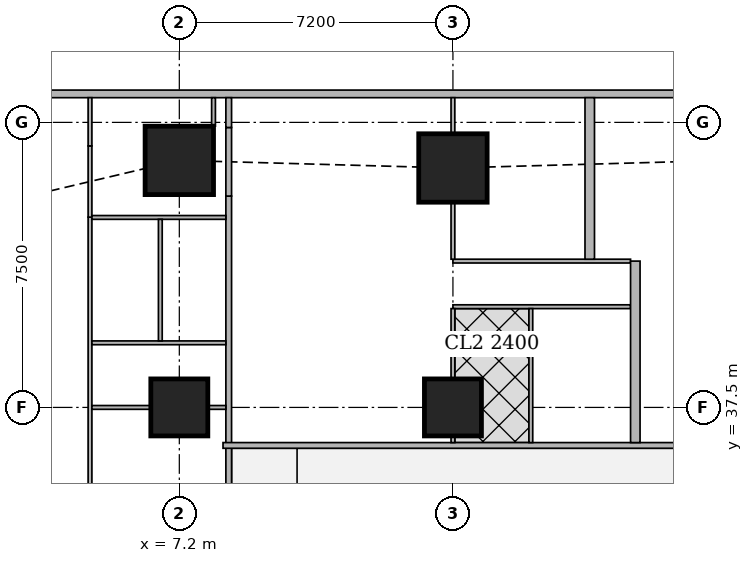
"""IFC4 building model, lengths in metres.
Left out: names, types, materials, properties, quantities, classifications, styles, units other than length and angle.
Written with IfcOpenShell. Run it as: python <this file> out.ifc"""

import sys

from ifc_helpers import new_model, si_unit, direction, frame, frame_2d, origin, origin_2d, place, context, subcontext, project, spatial, rectangle, extrude, element, fill, save


model = new_model("IFC4")
c1 = context("Model", 3, precision=1e-05, world=origin(), true_north=direction((0.0, 1.0)))
c2 = subcontext(c1, "Body", "Model", "MODEL_VIEW")
j1 = project(units=[si_unit("LENGTHUNIT", "METRE"), si_unit("PLANEANGLEUNIT", "RADIAN")], contexts=[c1])
p1 = place(None, origin())
s1 = spatial("IfcSite", under=j1, at=p1, CompositionType="ELEMENT")
p2 = place(p1, origin())
s2 = spatial("IfcBuilding", under=s1, at=p2, CompositionType="ELEMENT")
p3 = place(p2, frame((0.0, 0.0, 158.3)))
s3 = spatial("IfcBuildingStorey", under=s2, at=p3, CompositionType="ELEMENT", Elevation=158.3)
for number, where, z_axis, x_axis in (
    (1, (7.2, 37.5, 0.0), (0.0, 0.0, 1.0), (1.0, 0.0, 0.0)),
    (2, (14.4, 37.5, 0.0), (0.0, 0.0, 1.0), (1.0, 0.0, 0.0)),
):
    element("IfcColumn", number, at=place(p3, frame(where, z_axis=z_axis, x_axis=x_axis)), inside=s3, PredefinedType="COLUMN", context=c2, shape_type="SweptSolid", body=[
        extrude(rectangle(XDim=1.5, YDim=1.5, at=origin_2d()), origin(), (0.0, 0.0, 1.0), 3.75),
    ])
for number, where, z_axis, x_axis in (
    (3, (7.2, 44.0, 0.0), (0.0, 0.0, 1.0), (1.0, 0.0, 0.0)),
    (4, (14.4, 43.8, 0.0), (0.0, 0.0, 1.0), (1.0, 0.0, 0.0)),
):
    element("IfcColumn", number, at=place(p3, frame(where, z_axis=z_axis, x_axis=x_axis)), inside=s3, PredefinedType="COLUMN", context=c2, shape_type="SweptSolid", body=[
        extrude(rectangle(XDim=1.8, YDim=1.8, at=origin_2d()), origin(), (0.0, 0.0, 1.0), 3.75),
    ])
p4 = place(p3, frame((40.106, 45.75, 0.0), z_axis=(0.0, 0.0, 1.0), x_axis=(-1.0, 0.0, 0.0)))
e5 = element("IfcWall", 5, at=p4, inside=s3, PredefinedType="SOLIDWALL", context=c2, shape_type="SweptSolid", body=[
    extrude(rectangle(XDim=37.943, YDim=0.2, at=frame_2d((18.971, 0.0))), origin(), (0.0, 0.0, 1.0), 3.5),
])
p5 = place(p4, frame((8.606, 0.0, 0.9)))
e6 = element("IfcOpeningElement", 6, at=p5, cuts=e5, PredefinedType="OPENING", context=c2, shape_type="SweptSolid", body=[
    extrude(rectangle(XDim=1.8, YDim=1.5, at=frame_2d((0.9, 0.75))), frame((0.0, 0.11, 0.0), z_axis=(0.0, -1.0, 0.0), x_axis=(1.0, 0.0, 0.0)), (0.0, 0.0, 1.0), 0.22),
])
p6 = place(p4, frame((12.206, 0.0, 0.9)))
e7 = element("IfcOpeningElement", 7, at=p6, cuts=e5, PredefinedType="OPENING", context=c2, shape_type="SweptSolid", body=[
    extrude(rectangle(XDim=1.8, YDim=1.5, at=frame_2d((0.9, 0.75))), frame((0.0, 0.11, 0.0), z_axis=(0.0, -1.0, 0.0), x_axis=(1.0, 0.0, 0.0)), (0.0, 0.0, 1.0), 0.22),
])
p7 = place(p4, frame((15.806, 0.0, 0.9)))
e8 = element("IfcOpeningElement", 8, at=p7, cuts=e5, PredefinedType="OPENING", context=c2, shape_type="SweptSolid", body=[
    extrude(rectangle(XDim=1.8, YDim=1.5, at=frame_2d((0.9, 0.75))), frame((0.0, 0.11, 0.0), z_axis=(0.0, -1.0, 0.0), x_axis=(1.0, 0.0, 0.0)), (0.0, 0.0, 1.0), 0.22),
])
p8 = place(p4, frame((19.406, 0.0, 0.9)))
e9 = element("IfcOpeningElement", 9, at=p8, cuts=e5, PredefinedType="OPENING", context=c2, shape_type="SweptSolid", body=[
    extrude(rectangle(XDim=1.8, YDim=1.5, at=frame_2d((0.9, 0.75))), frame((0.0, 0.11, 0.0), z_axis=(0.0, -1.0, 0.0), x_axis=(1.0, 0.0, 0.0)), (0.0, 0.0, 1.0), 0.22),
])
p9 = place(p4, frame((23.006, 0.0, 0.9)))
e10 = element("IfcOpeningElement", 10, at=p9, cuts=e5, PredefinedType="OPENING", context=c2, shape_type="SweptSolid", body=[
    extrude(rectangle(XDim=1.8, YDim=1.5, at=frame_2d((0.9, 0.75))), frame((0.0, 0.11, 0.0), z_axis=(0.0, -1.0, 0.0), x_axis=(1.0, 0.0, 0.0)), (0.0, 0.0, 1.0), 0.22),
])
p10 = place(p4, frame((26.606, 0.0, 0.9)))
e11 = element("IfcOpeningElement", 11, at=p10, cuts=e5, PredefinedType="OPENING", context=c2, shape_type="SweptSolid", body=[
    extrude(rectangle(XDim=1.8, YDim=1.5, at=frame_2d((0.9, 0.75))), frame((0.0, 0.11, 0.0), z_axis=(0.0, -1.0, 0.0), x_axis=(1.0, 0.0, 0.0)), (0.0, 0.0, 1.0), 0.22),
])
p11 = place(p3, frame((8.5, 1.964, 0.0), z_axis=(0.0, 0.0, 1.0), x_axis=(0.0, 1.0, 0.0)))
e12 = element("IfcWall", 12, at=p11, inside=s3, PredefinedType="SOLIDWALL", context=c2, shape_type="SweptSolid", body=[
    extrude(rectangle(XDim=41.097, YDim=0.15, at=frame_2d((20.548, 0.0))), origin(), (0.0, 0.0, 1.0), 3.5),
])
p12 = place(p11, frame((6.911, 0.0, 0.0)))
e13 = element("IfcOpeningElement", 13, at=p12, cuts=e12, PredefinedType="OPENING", context=c2, shape_type="SweptSolid", body=[
    extrude(rectangle(XDim=1.0, YDim=2.1, at=frame_2d((0.5, 1.05))), frame((0.0, 0.085, 0.0), z_axis=(0.0, -1.0, 0.0), x_axis=(1.0, 0.0, 0.0)), (0.0, 0.0, 1.0), 0.17),
])
p13 = place(p11, frame((10.661, 0.0, 0.0)))
e14 = element("IfcOpeningElement", 14, at=p13, cuts=e12, PredefinedType="OPENING", context=c2, shape_type="SweptSolid", body=[
    extrude(rectangle(XDim=1.0, YDim=2.1, at=frame_2d((0.5, 1.05))), frame((0.0, 0.085, 0.0), z_axis=(0.0, -1.0, 0.0), x_axis=(1.0, 0.0, 0.0)), (0.0, 0.0, 1.0), 0.17),
])
p14 = place(p11, frame((25.661, 0.0, 0.0)))
e15 = element("IfcOpeningElement", 15, at=p14, cuts=e12, PredefinedType="OPENING", context=c2, shape_type="SweptSolid", body=[
    extrude(rectangle(XDim=1.0, YDim=2.1, at=frame_2d((0.5, 1.05))), frame((0.0, 0.085, 0.0), z_axis=(0.0, -1.0, 0.0), x_axis=(1.0, 0.0, 0.0)), (0.0, 0.0, 1.0), 0.17),
])
p15 = place(p3, frame((8.5, 43.061, 0.0), z_axis=(0.0, 0.0, 1.0), x_axis=(0.0, 1.0, 0.0)))
e16 = element("IfcWall", 16, at=p15, inside=s3, PredefinedType="SOLIDWALL", context=c2, shape_type="SweptSolid", body=[
    extrude(rectangle(XDim=1.805, YDim=0.15, at=frame_2d((0.902, 0.0))), origin(), (0.0, 0.0, 1.0), 2.1),
])
p16 = place(p3, frame((8.5, 44.866, 0.0), z_axis=(0.0, 0.0, 1.0), x_axis=(0.0, 1.0, 0.0)))
e17 = element("IfcWall", 17, at=p16, inside=s3, PredefinedType="SOLIDWALL", context=c2, shape_type="SweptSolid", body=[
    extrude(rectangle(XDim=0.784, YDim=0.15, at=frame_2d((0.392, 0.0))), origin(), (0.0, 0.0, 1.0), 3.5),
])
p17 = place(p3, frame((8.35, 36.5, 0.0), z_axis=(0.0, 0.0, 1.0), x_axis=(1.0, 0.0, 0.0)))
e18 = element("IfcWall", 18, at=p17, inside=s3, PredefinedType="SOLIDWALL", context=c2, shape_type="SweptSolid", body=[
    extrude(rectangle(XDim=26.415, YDim=0.15, at=frame_2d((13.208, 0.0))), origin(), (0.0, 0.0, 1.0), 3.5),
])
p18 = place(p17, frame((2.6, 0.0, 0.0)))
e19 = element("IfcOpeningElement", 19, at=p18, cuts=e18, PredefinedType="OPENING", context=c2, shape_type="SweptSolid", body=[
    extrude(rectangle(XDim=1.0, YDim=2.1, at=frame_2d((0.5, 1.05))), frame((0.0, 0.085, 0.0), z_axis=(0.0, -1.0, 0.0), x_axis=(1.0, 0.0, 0.0)), (0.0, 0.0, 1.0), 0.17),
])
p19 = place(p17, frame((10.949, 0.0, 0.0)))
e20 = element("IfcOpeningElement", 20, at=p19, cuts=e18, PredefinedType="OPENING", context=c2, shape_type="SweptSolid", body=[
    extrude(rectangle(XDim=1.0, YDim=2.1, at=frame_2d((0.5, 1.05))), frame((0.0, 0.085, 0.0), z_axis=(0.0, -1.0, 0.0), x_axis=(1.0, 0.0, 0.0)), (0.0, 0.0, 1.0), 0.17),
])
p20 = place(p3, frame((8.1, 45.65, 0.0), z_axis=(0.0, 0.0, 1.0), x_axis=(0.0, -1.0, 0.0)))
e21 = element("IfcWall", 21, at=p20, inside=s3, PredefinedType="PARTITIONING", context=c2, shape_type="SweptSolid", body=[
    extrude(rectangle(XDim=0.749, YDim=0.1, at=frame_2d((0.375, 0.0))), origin(), (0.0, 0.0, 1.0), 3.5),
])
p21 = place(p3, frame((4.85, 30.0, 0.0), z_axis=(0.0, 0.0, 1.0), x_axis=(0.0, 1.0, 0.0)))
e22 = element("IfcWall", 22, at=p21, inside=s3, PredefinedType="PARTITIONING", context=c2, shape_type="SweptSolid", body=[
    extrude(rectangle(XDim=12.507, YDim=0.1, at=frame_2d((6.253, 0.0))), origin(), (0.0, 0.0, 1.0), 3.5),
])
p22 = place(p21, frame((0.575, 0.0, 0.0)))
e23 = element("IfcOpeningElement", 23, at=p22, cuts=e22, PredefinedType="OPENING", context=c2, shape_type="SweptSolid", body=[
    extrude(rectangle(XDim=0.9, YDim=2.1, at=frame_2d((0.45, 1.05))), frame((0.0, 0.06, 0.0), z_axis=(0.0, -1.0, 0.0), x_axis=(1.0, 0.0, 0.0)), (0.0, 0.0, 1.0), 0.12),
])
p23 = place(p21, frame((5.799, 0.0, 0.0)))
e24 = element("IfcOpeningElement", 24, at=p23, cuts=e22, PredefinedType="OPENING", context=c2, shape_type="SweptSolid", body=[
    extrude(rectangle(XDim=0.9, YDim=2.1, at=frame_2d((0.45, 1.05))), frame((0.0, 0.06, 0.0), z_axis=(0.0, -1.0, 0.0), x_axis=(1.0, 0.0, 0.0)), (0.0, 0.0, 1.0), 0.12),
])
p24 = place(p21, frame((7.9, 0.0, 0.0)))
e25 = element("IfcOpeningElement", 25, at=p24, cuts=e22, PredefinedType="OPENING", context=c2, shape_type="SweptSolid", body=[
    extrude(rectangle(XDim=0.9, YDim=2.1, at=frame_2d((0.45, 1.05))), frame((0.0, 0.06, 0.0), z_axis=(0.0, -1.0, 0.0), x_axis=(1.0, 0.0, 0.0)), (0.0, 0.0, 1.0), 0.12),
])
p25 = place(p21, frame((3.075, 0.0, 0.0)))
e26 = element("IfcOpeningElement", 26, at=p25, cuts=e22, PredefinedType="OPENING", context=c2, shape_type="SweptSolid", body=[
    extrude(rectangle(XDim=0.9, YDim=2.1, at=frame_2d((0.45, 1.05))), frame((0.0, 0.06, 0.0), z_axis=(0.0, -1.0, 0.0), x_axis=(1.0, 0.0, 0.0)), (0.0, 0.0, 1.0), 0.12),
])
p26 = place(p21, frame((10.4, 0.0, 0.0)))
e27 = element("IfcOpeningElement", 27, at=p26, cuts=e22, PredefinedType="OPENING", context=c2, shape_type="SweptSolid", body=[
    extrude(rectangle(XDim=0.9, YDim=2.1, at=frame_2d((0.45, 1.05))), frame((0.0, 0.06, 0.0), z_axis=(0.0, -1.0, 0.0), x_axis=(1.0, 0.0, 0.0)), (0.0, 0.0, 1.0), 0.12),
])
p27 = place(p3, frame((4.85, 42.507, 0.0), z_axis=(0.0, 0.0, 1.0), x_axis=(0.0, 1.0, 0.0)))
e28 = element("IfcWall", 28, at=p27, inside=s3, PredefinedType="PARTITIONING", context=c2, shape_type="SweptSolid", body=[
    extrude(rectangle(XDim=1.874, YDim=0.1, at=frame_2d((0.937, 0.0))), origin(), (0.0, 0.0, 1.0), 2.1),
])
p28 = place(p3, frame((4.85, 44.381, 0.0), z_axis=(0.0, 0.0, 1.0), x_axis=(0.0, 1.0, 0.0)))
e29 = element("IfcWall", 29, at=p28, inside=s3, PredefinedType="PARTITIONING", context=c2, shape_type="SweptSolid", body=[
    extrude(rectangle(XDim=1.269, YDim=0.1, at=frame_2d((0.634, 0.0))), origin(), (0.0, 0.0, 1.0), 3.5),
])
p29 = place(p28, frame((0.15, 0.0, 0.0)))
e30 = element("IfcOpeningElement", 30, at=p29, cuts=e29, PredefinedType="OPENING", context=c2, shape_type="SweptSolid", body=[
    extrude(rectangle(XDim=0.9, YDim=2.1, at=frame_2d((0.45, 1.05))), frame((0.0, 0.06, 0.0), z_axis=(0.0, -1.0, 0.0), x_axis=(1.0, 0.0, 0.0)), (0.0, 0.0, 1.0), 0.12),
])
p30 = place(p3, frame((4.9, 37.5, 0.0), z_axis=(0.0, 0.0, 1.0), x_axis=(1.0, 0.0, 0.0)))
e31 = element("IfcWall", 31, at=p30, inside=s3, PredefinedType="PARTITIONING", context=c2, shape_type="SweptSolid", body=[
    extrude(rectangle(XDim=1.549, YDim=0.1, at=frame_2d((0.774, 0.0))), origin(), (0.0, 0.0, 1.0), 3.5),
])
p31 = place(p3, frame((7.951, 37.5, 0.0), z_axis=(0.0, 0.0, 1.0), x_axis=(1.0, 0.0, 0.0)))
e32 = element("IfcWall", 32, at=p31, inside=s3, PredefinedType="PARTITIONING", context=c2, shape_type="SweptSolid", body=[
    extrude(rectangle(XDim=0.474, YDim=0.1, at=frame_2d((0.237, 0.0))), origin(), (0.0, 0.0, 1.0), 3.5),
])
for number, where, z_axis, x_axis in (
    (33, (4.9, 42.499, 0.0), (0.0, 0.0, 1.0), (1.0, 0.0, 0.0)),
    (34, (4.9, 39.2, 0.0), (0.0, 0.0, 1.0), (1.0, 0.0, 0.0)),
):
    element("IfcWall", number, at=place(p3, frame(where, z_axis=z_axis, x_axis=x_axis)), inside=s3, PredefinedType="PARTITIONING", context=c2, shape_type="SweptSolid", body=[
        extrude(rectangle(XDim=3.525, YDim=0.1, at=frame_2d((1.763, 0.0))), origin(), (0.0, 0.0, 1.0), 3.5),
    ])
p32 = place(p3, frame((14.4, 41.35, 0.0), z_axis=(0.0, 0.0, 1.0), x_axis=(1.0, 0.0, 0.0)))
e35 = element("IfcWall", 35, at=p32, inside=s3, PredefinedType="PARTITIONING", context=c2, shape_type="SweptSolid", body=[
    extrude(rectangle(XDim=4.674, YDim=0.1, at=frame_2d((2.337, 0.0))), origin(), (0.0, 0.0, 1.0), 3.5),
])
p33 = place(p32, frame((0.2, 0.0, 0.0)))
e36 = element("IfcOpeningElement", 36, at=p33, cuts=e35, PredefinedType="OPENING", context=c2, shape_type="SweptSolid", body=[
    extrude(rectangle(XDim=0.9, YDim=2.1, at=frame_2d((0.45, 1.05))), frame((0.0, 0.06, 0.0), z_axis=(0.0, -1.0, 0.0), x_axis=(1.0, 0.0, 0.0)), (0.0, 0.0, 1.0), 0.12),
])
p34 = place(p3, frame((14.4, 40.15, 0.0), z_axis=(0.0, 0.0, 1.0), x_axis=(1.0, 0.0, 0.0)))
e37 = element("IfcWall", 37, at=p34, inside=s3, PredefinedType="PARTITIONING", context=c2, shape_type="SweptSolid", body=[
    extrude(rectangle(XDim=4.674, YDim=0.1, at=frame_2d((2.337, 0.0))), origin(), (0.0, 0.0, 1.0), 3.5),
])
p35 = place(p34, frame((0.575, 0.0, 0.0)))
e38 = element("IfcOpeningElement", 38, at=p35, cuts=e37, PredefinedType="OPENING", context=c2, shape_type="SweptSolid", body=[
    extrude(rectangle(XDim=0.9, YDim=2.1, at=frame_2d((0.45, 1.05))), frame((0.0, 0.06, 0.0), z_axis=(0.0, -1.0, 0.0), x_axis=(1.0, 0.0, 0.0)), (0.0, 0.0, 1.0), 0.12),
])
p36 = place(p34, frame((2.975, 0.0, 0.0)))
e39 = element("IfcOpeningElement", 39, at=p36, cuts=e37, PredefinedType="OPENING", context=c2, shape_type="SweptSolid", body=[
    extrude(rectangle(XDim=0.9, YDim=2.1, at=frame_2d((0.45, 1.05))), frame((0.0, 0.06, 0.0), z_axis=(0.0, -1.0, 0.0), x_axis=(1.0, 0.0, 0.0)), (0.0, 0.0, 1.0), 0.12),
])
p37 = place(p3, frame((14.4, 41.4, 0.0), z_axis=(0.0, 0.0, 1.0), x_axis=(0.0, 1.0, 0.0)))
e40 = element("IfcWall", 40, at=p37, inside=s3, PredefinedType="PARTITIONING", context=c2, shape_type="SweptSolid", body=[
    extrude(rectangle(XDim=1.499, YDim=0.1, at=frame_2d((0.75, 0.0))), origin(), (0.0, 0.0, 1.0), 3.5),
])
p38 = place(p3, frame((14.4, 44.701, 0.0), z_axis=(0.0, 0.0, 1.0), x_axis=(0.0, 1.0, 0.0)))
e41 = element("IfcWall", 41, at=p38, inside=s3, PredefinedType="PARTITIONING", context=c2, shape_type="SweptSolid", body=[
    extrude(rectangle(XDim=0.949, YDim=0.1, at=frame_2d((0.475, 0.0))), origin(), (0.0, 0.0, 1.0), 3.5),
])
p39 = place(p3, frame((14.4, 36.575, 0.0), z_axis=(0.0, 0.0, 1.0), x_axis=(0.0, 1.0, 0.0)))
e42 = element("IfcWall", 42, at=p39, inside=s3, PredefinedType="PARTITIONING", context=c2, shape_type="SweptSolid", body=[
    extrude(rectangle(XDim=0.174, YDim=0.1, at=frame_2d((0.087, 0.0))), origin(), (0.0, 0.0, 1.0), 3.5),
])
p40 = place(p3, frame((14.4, 38.251, 0.0), z_axis=(0.0, 0.0, 1.0), x_axis=(0.0, 1.0, 0.0)))
e43 = element("IfcWall", 43, at=p40, inside=s3, PredefinedType="PARTITIONING", context=c2, shape_type="SweptSolid", body=[
    extrude(rectangle(XDim=1.849, YDim=0.1, at=frame_2d((0.925, 0.0))), origin(), (0.0, 0.0, 1.0), 3.5),
])
p41 = place(p3, frame((16.45, 36.575, 0.0), z_axis=(0.0, 0.0, 1.0), x_axis=(0.0, 1.0, 0.0)))
e44 = element("IfcWall", 44, at=p41, inside=s3, PredefinedType="PARTITIONING", context=c2, shape_type="SweptSolid", body=[
    extrude(rectangle(XDim=3.525, YDim=0.1, at=frame_2d((1.763, 0.0))), origin(), (0.0, 0.0, 1.0), 3.5),
])
p42 = place(p3, frame((18.0, 41.4, 0.0), z_axis=(0.0, 0.0, 1.0), x_axis=(0.0, 1.0, 0.0)))
e45 = element("IfcWall", 45, at=p42, inside=s3, PredefinedType="SOLIDWALL", context=c2, shape_type="SweptSolid", body=[
    extrude(rectangle(XDim=4.25, YDim=0.25, at=frame_2d((2.125, 0.0))), origin(), (0.0, 0.0, 1.0), 2.1),
])
p43 = place(p3, frame((19.199, 36.575, 0.0), z_axis=(0.0, 0.0, 1.0), x_axis=(0.0, 1.0, 0.0)))
e46 = element("IfcWall", 46, at=p43, inside=s3, PredefinedType="SOLIDWALL", context=c2, shape_type="SweptSolid", body=[
    extrude(rectangle(XDim=4.775, YDim=0.25, at=frame_2d((2.388, 0.0))), origin(), (0.0, 0.0, 1.0), 3.5),
])
p44 = place(p3, frame((6.7, 39.25, 0.0), z_axis=(0.0, 0.0, 1.0), x_axis=(0.0, 1.0, 0.0)))
e47 = element("IfcWall", 47, at=p44, inside=s3, PredefinedType="PARTITIONING", context=c2, shape_type="SweptSolid", body=[
    extrude(rectangle(XDim=3.199, YDim=0.1, at=frame_2d((1.6, 0.0))), origin(), (0.0, 0.0, 1.0), 3.5),
])
p45 = place(p44, frame((1.15, 0.0, 0.0)))
e48 = element("IfcOpeningElement", 48, at=p45, cuts=e47, PredefinedType="OPENING", context=c2, shape_type="SweptSolid", body=[
    extrude(rectangle(XDim=0.9, YDim=2.1, at=frame_2d((0.45, 1.05))), frame((0.0, 0.06, 0.0), z_axis=(0.0, -1.0, 0.0), x_axis=(1.0, 0.0, 0.0)), (0.0, 0.0, 1.0), 0.12),
])
p46 = place(p8, origin())
e49 = element("IfcWindow", 49, at=p46, inside=s3, PartitioningType="SINGLE_PANEL", PredefinedType="WINDOW", context=c2, shape_type="SweptSolid", body=[
    extrude(rectangle(XDim=1.8, YDim=1.5, at=frame_2d((0.9, 0.75))), frame((0.0, 0.03, 0.0), z_axis=(0.0, -1.0, 0.0), x_axis=(1.0, 0.0, 0.0)), (0.0, 0.0, 1.0), 0.06),
])
fill(e9, e49)
p47 = place(p9, origin())
e50 = element("IfcWindow", 50, at=p47, inside=s3, PartitioningType="SINGLE_PANEL", PredefinedType="WINDOW", context=c2, shape_type="SweptSolid", body=[
    extrude(rectangle(XDim=1.8, YDim=1.5, at=frame_2d((0.9, 0.75))), frame((0.0, 0.03, 0.0), z_axis=(0.0, -1.0, 0.0), x_axis=(1.0, 0.0, 0.0)), (0.0, 0.0, 1.0), 0.06),
])
fill(e10, e50)
p48 = place(p10, origin())
e51 = element("IfcWindow", 51, at=p48, inside=s3, PartitioningType="SINGLE_PANEL", PredefinedType="WINDOW", context=c2, shape_type="SweptSolid", body=[
    extrude(rectangle(XDim=1.8, YDim=1.5, at=frame_2d((0.9, 0.75))), frame((0.0, 0.03, 0.0), z_axis=(0.0, -1.0, 0.0), x_axis=(1.0, 0.0, 0.0)), (0.0, 0.0, 1.0), 0.06),
])
fill(e11, e51)
p49 = place(p23, origin())
e52 = element("IfcDoor", 52, at=p49, inside=s3, OperationType="SINGLE_SWING_RIGHT", PredefinedType="DOOR", context=c2, shape_type="SweptSolid", body=[
    extrude(rectangle(XDim=0.9, YDim=2.1, at=frame_2d((0.45, 1.05))), frame((0.0, 0.025, 0.0), z_axis=(0.0, -1.0, 0.0), x_axis=(1.0, 0.0, 0.0)), (0.0, 0.0, 1.0), 0.05),
])
fill(e24, e52)
p50 = place(p24, origin())
e53 = element("IfcDoor", 53, at=p50, inside=s3, OperationType="SINGLE_SWING_RIGHT", PredefinedType="DOOR", context=c2, shape_type="SweptSolid", body=[
    extrude(rectangle(XDim=0.9, YDim=2.1, at=frame_2d((0.45, 1.05))), frame((0.0, 0.025, 0.0), z_axis=(0.0, -1.0, 0.0), x_axis=(1.0, 0.0, 0.0)), (0.0, 0.0, 1.0), 0.05),
])
fill(e25, e53)
p51 = place(p29, origin())
e54 = element("IfcDoor", 54, at=p51, inside=s3, OperationType="SINGLE_SWING_RIGHT", PredefinedType="DOOR", context=c2, shape_type="SweptSolid", body=[
    extrude(rectangle(XDim=0.9, YDim=2.1, at=frame_2d((0.45, 1.05))), frame((0.0, 0.025, 0.0), z_axis=(0.0, -1.0, 0.0), x_axis=(1.0, 0.0, 0.0)), (0.0, 0.0, 1.0), 0.05),
])
fill(e30, e54)
p52 = place(p26, origin())
e55 = element("IfcDoor", 55, at=p52, inside=s3, OperationType="SINGLE_SWING_LEFT", PredefinedType="DOOR", context=c2, shape_type="SweptSolid", body=[
    extrude(rectangle(XDim=0.9, YDim=2.1, at=frame_2d((0.45, 1.05))), frame((0.0, 0.025, 0.0), z_axis=(0.0, -1.0, 0.0), x_axis=(1.0, 0.0, 0.0)), (0.0, 0.0, 1.0), 0.05),
])
fill(e27, e55)
p53 = place(p33, origin())
e56 = element("IfcDoor", 56, at=p53, inside=s3, OperationType="SINGLE_SWING_LEFT", PredefinedType="DOOR", context=c2, shape_type="SweptSolid", body=[
    extrude(rectangle(XDim=0.9, YDim=2.1, at=frame_2d((0.45, 1.05))), frame((0.0, 0.025, 0.0), z_axis=(0.0, -1.0, 0.0), x_axis=(1.0, 0.0, 0.0)), (0.0, 0.0, 1.0), 0.05),
])
fill(e36, e56)
p54 = place(p35, origin())
e57 = element("IfcDoor", 57, at=p54, inside=s3, OperationType="SINGLE_SWING_RIGHT", PredefinedType="DOOR", context=c2, shape_type="SweptSolid", body=[
    extrude(rectangle(XDim=0.9, YDim=2.1, at=frame_2d((0.45, 1.05))), frame((0.0, 0.025, 0.0), z_axis=(0.0, -1.0, 0.0), x_axis=(1.0, 0.0, 0.0)), (0.0, 0.0, 1.0), 0.05),
])
fill(e38, e57)
p55 = place(p36, origin())
e58 = element("IfcDoor", 58, at=p55, inside=s3, OperationType="SINGLE_SWING_LEFT", PredefinedType="DOOR", context=c2, shape_type="SweptSolid", body=[
    extrude(rectangle(XDim=0.9, YDim=2.1, at=frame_2d((0.45, 1.05))), frame((0.0, 0.025, 0.0), z_axis=(0.0, -1.0, 0.0), x_axis=(1.0, 0.0, 0.0)), (0.0, 0.0, 1.0), 0.05),
])
fill(e39, e58)
p56 = place(p18, origin())
e59 = element("IfcDoor", 59, at=p56, inside=s3, OperationType="SINGLE_SWING_LEFT", PredefinedType="DOOR", context=c2, shape_type="SweptSolid", body=[
    extrude(rectangle(XDim=1.0, YDim=2.1, at=frame_2d((0.5, 1.05))), frame((0.0, 0.025, 0.0), z_axis=(0.0, -1.0, 0.0), x_axis=(1.0, 0.0, 0.0)), (0.0, 0.0, 1.0), 0.05),
])
fill(e19, e59)
p57 = place(p19, origin())
e60 = element("IfcDoor", 60, at=p57, inside=s3, OperationType="SINGLE_SWING_LEFT", PredefinedType="DOOR", context=c2, shape_type="SweptSolid", body=[
    extrude(rectangle(XDim=1.0, YDim=2.1, at=frame_2d((0.5, 1.05))), frame((0.0, 0.025, 0.0), z_axis=(0.0, -1.0, 0.0), x_axis=(1.0, 0.0, 0.0)), (0.0, 0.0, 1.0), 0.05),
])
fill(e20, e60)
p58 = place(p45, origin())
e61 = element("IfcDoor", 61, at=p58, inside=s3, OperationType="SINGLE_SWING_LEFT", PredefinedType="DOOR", context=c2, shape_type="SweptSolid", body=[
    extrude(rectangle(XDim=0.9, YDim=2.1, at=frame_2d((0.45, 1.05))), frame((0.0, 0.025, 0.0), z_axis=(0.0, -1.0, 0.0), x_axis=(1.0, 0.0, 0.0)), (0.0, 0.0, 1.0), 0.05),
])
fill(e48, e61)
save(model, sys.argv[1])
